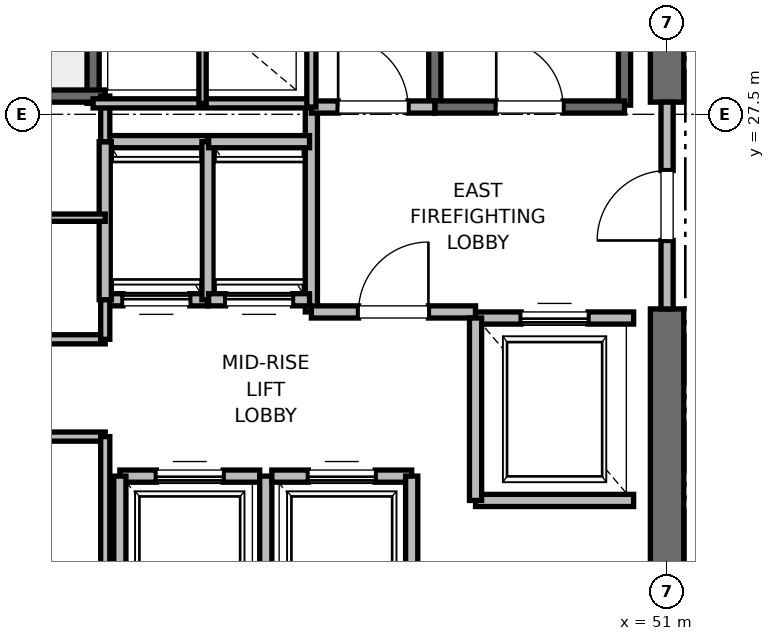
"""IFC4 building model, lengths in metres.
Left out: names, types, materials, properties, quantities, classifications, styles, units other than length and angle.
Written with IfcOpenShell. Run it as: python <this file> out.ifc"""

import sys

from ifc_helpers import new_model, si_unit, direction, frame, frame_2d, origin, place, context, subcontext, project, spatial, rectangle, extrude, element, fill, save


model = new_model("IFC4")
c1 = context("Model", 3, precision=1e-05, world=origin(), true_north=direction((0.0, 1.0)))
c2 = subcontext(c1, "Body", "Model", "MODEL_VIEW")
j1 = project(units=[si_unit("LENGTHUNIT", "METRE"), si_unit("PLANEANGLEUNIT", "RADIAN")], contexts=[c1])
p1 = place(None, origin())
s1 = spatial("IfcSite", under=j1, at=p1, CompositionType="ELEMENT")
p2 = place(p1, origin())
s2 = spatial("IfcBuilding", under=s1, at=p2, CompositionType="ELEMENT")
p3 = place(p2, frame((0.0, 0.0, 168.4)))
s3 = spatial("IfcBuildingStorey", under=s2, at=p3, CompositionType="ELEMENT", Elevation=168.4)
p4 = place(p3, frame((51.0, 18.5, 0.0), z_axis=(0.0, 0.0, 1.0), x_axis=(0.0, 1.0, 0.0)))
e1 = element("IfcWall", 1, at=p4, inside=s3, PredefinedType="SHEAR", context=c2, shape_type="SweptSolid", body=[
    extrude(rectangle(XDim=5.8, YDim=0.55, at=frame_2d((2.9, 0.0))), origin(), (0.0, 0.0, 1.0), 3.775),
])
p5 = place(p3, frame((51.0, 27.7, 0.0), z_axis=(0.0, 0.0, 1.0), x_axis=(0.0, 1.0, 0.0)))
e2 = element("IfcWall", 2, at=p5, inside=s3, PredefinedType="SHEAR", context=c2, shape_type="SweptSolid", body=[
    extrude(rectangle(XDim=8.8, YDim=0.55, at=frame_2d((4.4, 0.0))), origin(), (0.0, 0.0, 1.0), 3.775),
])
p6 = place(p3, frame((50.3, 27.65, 0.0), z_axis=(0.0, 0.0, 1.0), x_axis=(0.0, 1.0, 0.0)))
e3 = element("IfcWall", 3, at=p6, inside=s3, PredefinedType="SOLIDWALL", context=c2, shape_type="SweptSolid", body=[
    extrude(rectangle(XDim=8.15, YDim=0.2, at=frame_2d((4.075, 0.0))), origin(), (0.0, 0.0, 1.0), 3.775),
])
p7 = place(p3, frame((47.18, 27.62, 0.0), z_axis=(0.0, 0.0, 1.0), x_axis=(0.0, 1.0, 0.0)))
e4 = element("IfcWall", 4, at=p7, inside=s3, PredefinedType="SOLIDWALL", context=c2, shape_type="SweptSolid", body=[
    extrude(rectangle(XDim=8.18, YDim=0.2, at=frame_2d((4.09, 0.0))), origin(), (0.0, 0.0, 1.0), 3.775),
])
p8 = place(p3, frame((47.18, 27.62, 0.0), z_axis=(0.0, 0.0, 1.0), x_axis=(1.0, 0.0, 0.0)))
e5 = element("IfcWall", 5, at=p8, inside=s3, PredefinedType="SOLIDWALL", context=c2, shape_type="SweptSolid", body=[
    extrude(rectangle(XDim=3.12, YDim=0.2, at=frame_2d((1.56, 0.0))), origin(), (0.0, 0.0, 1.0), 3.775),
])
p9 = place(p8, frame((1.01, 0.0, 0.0)))
e6 = element("IfcOpeningElement", 6, at=p9, cuts=e5, PredefinedType="OPENING", context=c2, shape_type="SweptSolid", body=[
    extrude(rectangle(XDim=1.1, YDim=2.15, at=frame_2d((0.55, 1.075))), frame((0.0, 0.1, 0.0), z_axis=(0.0, -1.0, 0.0), x_axis=(1.0, 0.0, 0.0)), (0.0, 0.0, 1.0), 0.2),
])
p10 = place(p3, frame((41.56, 27.68, 0.0), z_axis=(0.0, 0.0, 1.0), x_axis=(0.0, 1.0, 0.0)))
e7 = element("IfcWall", 7, at=p10, inside=s3, PredefinedType="SOLIDWALL", context=c2, shape_type="SweptSolid", body=[
    extrude(rectangle(XDim=8.57, YDim=0.2, at=frame_2d((4.285, 0.0))), origin(), (0.0, 0.0, 1.0), 3.775),
])
p11 = place(p3, frame((38.44, 27.8, 0.0), z_axis=(0.0, 0.0, 1.0), x_axis=(1.0, 0.0, 0.0)))
e8 = element("IfcWall", 8, at=p11, inside=s3, PredefinedType="SOLIDWALL", context=c2, shape_type="SweptSolid", body=[
    extrude(rectangle(XDim=3.32, YDim=0.2, at=frame_2d((1.66, 0.0))), origin(), (0.0, 0.0, 1.0), 3.775),
])
p12 = place(p3, frame((45.15, 24.25, 0.0), z_axis=(0.0, 0.0, 1.0), x_axis=(0.0, 1.0, 0.0)))
e9 = element("IfcWall", 9, at=p12, inside=s3, PredefinedType="PARTITIONING", context=c2, shape_type="SweptSolid", body=[
    extrude(rectangle(XDim=3.37, YDim=0.2, at=frame_2d((1.685, 0.0))), origin(), (0.0, 0.0, 1.0), 3.775),
])
p13 = place(p3, frame((45.15, 24.25, 0.0), z_axis=(0.0, 0.0, 1.0), x_axis=(1.0, 0.0, 0.0)))
e10 = element("IfcWall", 10, at=p13, inside=s3, PredefinedType="PARTITIONING", context=c2, shape_type="SweptSolid", body=[
    extrude(rectangle(XDim=2.7, YDim=0.2, at=frame_2d((1.35, 0.0))), origin(), (0.0, 0.0, 1.0), 3.775),
])
p14 = place(p13, frame((0.775, 0.0, 0.0)))
e11 = element("IfcOpeningElement", 11, at=p14, cuts=e10, PredefinedType="OPENING", context=c2, shape_type="SweptSolid", body=[
    extrude(rectangle(XDim=1.15, YDim=2.2, at=frame_2d((0.575, 1.1))), frame((0.0, 0.1, 0.0), z_axis=(0.0, -1.0, 0.0), x_axis=(1.0, 0.0, 0.0)), (0.0, 0.0, 1.0), 0.2),
])
p15 = place(p3, frame((45.15, 27.62, 0.0), z_axis=(0.0, 0.0, 1.0), x_axis=(1.0, 0.0, 0.0)))
e12 = element("IfcWall", 12, at=p15, inside=s3, PredefinedType="PARTITIONING", context=c2, shape_type="SweptSolid", body=[
    extrude(rectangle(XDim=2.03, YDim=0.2, at=frame_2d((1.015, 0.0))), origin(), (0.0, 0.0, 1.0), 3.775),
])
p16 = place(p15, frame((0.44, 0.0, 0.0)))
e13 = element("IfcOpeningElement", 13, at=p16, cuts=e12, PredefinedType="OPENING", context=c2, shape_type="SweptSolid", body=[
    extrude(rectangle(XDim=1.15, YDim=2.2, at=frame_2d((0.575, 1.1))), frame((0.0, 0.1, 0.0), z_axis=(0.0, -1.0, 0.0), x_axis=(1.0, 0.0, 0.0)), (0.0, 0.0, 1.0), 0.2),
])
p17 = place(p3, frame((51.0, 24.3, 0.0), z_axis=(0.0, 0.0, 1.0), x_axis=(0.0, 1.0, 0.0)))
e14 = element("IfcWall", 14, at=p17, inside=s3, PredefinedType="PARTITIONING", context=c2, shape_type="SweptSolid", body=[
    extrude(rectangle(XDim=3.4, YDim=0.2, at=frame_2d((1.7, 0.0))), origin(), (0.0, 0.0, 1.0), 2.755),
])
p18 = place(p17, frame((1.125, 0.0, 0.0)))
e15 = element("IfcOpeningElement", 15, at=p18, cuts=e14, PredefinedType="OPENING", context=c2, shape_type="SweptSolid", body=[
    extrude(rectangle(XDim=1.15, YDim=2.2, at=frame_2d((0.575, 1.1))), frame((0.0, 0.1, 0.0), z_axis=(0.0, -1.0, 0.0), x_axis=(1.0, 0.0, 0.0)), (0.0, 0.0, 1.0), 0.2),
])
p19 = place(p3, frame((47.85, 21.15, 0.0), z_axis=(0.0, 0.0, 1.0), x_axis=(1.0, 0.0, 0.0)))
e16 = element("IfcWall", 16, at=p19, inside=s3, PredefinedType="SOLIDWALL", context=c2, shape_type="SweptSolid", body=[
    extrude(rectangle(XDim=2.6, YDim=0.2, at=frame_2d((1.3, 0.0))), origin(), (0.0, 0.0, 1.0), 3.775),
])
p20 = place(p3, frame((50.45, 24.15, 0.0), z_axis=(0.0, 0.0, 1.0), x_axis=(-1.0, 0.0, 0.0)))
e17 = element("IfcWall", 17, at=p20, inside=s3, PredefinedType="SOLIDWALL", context=c2, shape_type="SweptSolid", body=[
    extrude(rectangle(XDim=2.6, YDim=0.2, at=frame_2d((1.3, 0.0))), origin(), (0.0, 0.0, 1.0), 2.755),
])
p21 = place(p20, frame((0.75, 0.0, 0.0)))
e18 = element("IfcOpeningElement", 18, at=p21, cuts=e17, PredefinedType="OPENING", context=c2, shape_type="SweptSolid", body=[
    extrude(rectangle(XDim=1.1, YDim=2.2, at=frame_2d((0.55, 1.1))), frame((0.0, 0.1, 0.0), z_axis=(0.0, -1.0, 0.0), x_axis=(1.0, 0.0, 0.0)), (0.0, 0.0, 1.0), 0.2),
])
p22 = place(p3, frame((47.85, 24.15, 0.0), z_axis=(0.0, 0.0, 1.0), x_axis=(0.0, -1.0, 0.0)))
e19 = element("IfcWall", 19, at=p22, inside=s3, PredefinedType="SOLIDWALL", context=c2, shape_type="SweptSolid", body=[
    extrude(rectangle(XDim=3.0, YDim=0.2, at=frame_2d((1.5, 0.0))), origin(), (0.0, 0.0, 1.0), 3.775),
])
p23 = place(p3, frame((44.3, 21.55, 0.0), z_axis=(0.0, 0.0, 1.0), x_axis=(-1.0, 0.0, 0.0)))
e20 = element("IfcWall", 20, at=p23, inside=s3, PredefinedType="SOLIDWALL", context=c2, shape_type="SweptSolid", body=[
    extrude(rectangle(XDim=2.3, YDim=0.2, at=frame_2d((1.15, 0.0))), origin(), (0.0, 0.0, 1.0), 3.775),
])
p24 = place(p23, frame((0.6, 0.0, 0.0)))
e21 = element("IfcOpeningElement", 21, at=p24, cuts=e20, PredefinedType="OPENING", context=c2, shape_type="SweptSolid", body=[
    extrude(rectangle(XDim=1.1, YDim=2.2, at=frame_2d((0.55, 1.1))), frame((0.0, 0.1, 0.0), z_axis=(0.0, -1.0, 0.0), x_axis=(1.0, 0.0, 0.0)), (0.0, 0.0, 1.0), 0.2),
])
p25 = place(p3, frame((42.0, 21.55, 0.0), z_axis=(0.0, 0.0, 1.0), x_axis=(0.0, -1.0, 0.0)))
e22 = element("IfcWall", 22, at=p25, inside=s3, PredefinedType="SOLIDWALL", context=c2, shape_type="SweptSolid", body=[
    extrude(rectangle(XDim=2.6, YDim=0.2, at=frame_2d((1.3, 0.0))), origin(), (0.0, 0.0, 1.0), 2.755),
])
p26 = place(p3, frame((44.4, 18.95, 0.0), z_axis=(0.0, 0.0, 1.0), x_axis=(0.0, 1.0, 0.0)))
e23 = element("IfcWall", 23, at=p26, inside=s3, PredefinedType="SOLIDWALL", context=c2, shape_type="SweptSolid", body=[
    extrude(rectangle(XDim=2.6, YDim=0.2, at=frame_2d((1.3, 0.0))), origin(), (0.0, 0.0, 1.0), 3.775),
])
p27 = place(p3, frame((46.8, 21.55, 0.0), z_axis=(0.0, 0.0, 1.0), x_axis=(-1.0, 0.0, 0.0)))
e24 = element("IfcWall", 24, at=p27, inside=s3, PredefinedType="SOLIDWALL", context=c2, shape_type="SweptSolid", body=[
    extrude(rectangle(XDim=2.3, YDim=0.2, at=frame_2d((1.15, 0.0))), origin(), (0.0, 0.0, 1.0), 3.775),
])
p28 = place(p27, frame((0.6, 0.0, 0.0)))
e25 = element("IfcOpeningElement", 25, at=p28, cuts=e24, PredefinedType="OPENING", context=c2, shape_type="SweptSolid", body=[
    extrude(rectangle(XDim=1.1, YDim=2.2, at=frame_2d((0.55, 1.1))), frame((0.0, 0.1, 0.0), z_axis=(0.0, -1.0, 0.0), x_axis=(1.0, 0.0, 0.0)), (0.0, 0.0, 1.0), 0.2),
])
p29 = place(p3, frame((46.8, 18.95, 0.0), z_axis=(0.0, 0.0, 1.0), x_axis=(0.0, 1.0, 0.0)))
e26 = element("IfcWall", 26, at=p29, inside=s3, PredefinedType="SOLIDWALL", context=c2, shape_type="SweptSolid", body=[
    extrude(rectangle(XDim=2.6, YDim=0.2, at=frame_2d((1.3, 0.0))), origin(), (0.0, 0.0, 1.0), 3.775),
])
p30 = place(p3, frame((41.76, 24.45, 0.0), z_axis=(0.0, 0.0, 1.0), x_axis=(1.0, 0.0, 0.0)))
e27 = element("IfcWall", 27, at=p30, inside=s3, PredefinedType="SOLIDWALL", context=c2, shape_type="SweptSolid", body=[
    extrude(rectangle(XDim=1.68, YDim=0.2, at=frame_2d((0.84, 0.0))), origin(), (0.0, 0.0, 1.0), 3.775),
])
p31 = place(p30, frame((0.29, 0.0, 0.0)))
e28 = element("IfcOpeningElement", 28, at=p31, cuts=e27, PredefinedType="OPENING", context=c2, shape_type="SweptSolid", body=[
    extrude(rectangle(XDim=1.1, YDim=2.2, at=frame_2d((0.55, 1.1))), frame((0.0, 0.1, 0.0), z_axis=(0.0, -1.0, 0.0), x_axis=(1.0, 0.0, 0.0)), (0.0, 0.0, 1.0), 0.2),
])
p32 = place(p3, frame((43.44, 27.05, 0.0), z_axis=(0.0, 0.0, 1.0), x_axis=(-1.0, 0.0, 0.0)))
e29 = element("IfcWall", 29, at=p32, inside=s3, PredefinedType="SOLIDWALL", context=c2, shape_type="SweptSolid", body=[
    extrude(rectangle(XDim=1.68, YDim=0.2, at=frame_2d((0.84, 0.0))), origin(), (0.0, 0.0, 1.0), 3.775),
])
for number, where, z_axis, x_axis in (
    (30, (41.76, 27.05, 0.0), (0.0, 0.0, 1.0), (0.0, -1.0, 0.0)),
    (31, (43.45, 24.45, 0.0), (0.0, 0.0, 1.0), (0.0, 1.0, 0.0)),
):
    element("IfcWall", number, at=place(p3, frame(where, z_axis=z_axis, x_axis=x_axis)), inside=s3, PredefinedType="SOLIDWALL", context=c2, shape_type="SweptSolid", body=[
        extrude(rectangle(XDim=2.6, YDim=0.2, at=frame_2d((1.3, 0.0))), origin(), (0.0, 0.0, 1.0), 3.775),
    ])
p33 = place(p3, frame((43.46, 24.45, 0.0), z_axis=(0.0, 0.0, 1.0), x_axis=(1.0, 0.0, 0.0)))
e32 = element("IfcWall", 32, at=p33, inside=s3, PredefinedType="SOLIDWALL", context=c2, shape_type="SweptSolid", body=[
    extrude(rectangle(XDim=1.66, YDim=0.2, at=frame_2d((0.83, 0.0))), origin(), (0.0, 0.0, 1.0), 3.775),
])
p34 = place(p33, frame((0.28, 0.0, 0.0)))
e33 = element("IfcOpeningElement", 33, at=p34, cuts=e32, PredefinedType="OPENING", context=c2, shape_type="SweptSolid", body=[
    extrude(rectangle(XDim=1.1, YDim=2.2, at=frame_2d((0.55, 1.1))), frame((0.0, 0.1, 0.0), z_axis=(0.0, -1.0, 0.0), x_axis=(1.0, 0.0, 0.0)), (0.0, 0.0, 1.0), 0.2),
])
p35 = place(p3, frame((45.12, 27.05, 0.0), z_axis=(0.0, 0.0, 1.0), x_axis=(-1.0, 0.0, 0.0)))
e34 = element("IfcWall", 34, at=p35, inside=s3, PredefinedType="SOLIDWALL", context=c2, shape_type="SweptSolid", body=[
    extrude(rectangle(XDim=1.66, YDim=0.2, at=frame_2d((0.83, 0.0))), origin(), (0.0, 0.0, 1.0), 3.775),
])
for number, where, z_axis, x_axis in (
    (35, (39.95, 22.2, 0.0), (0.0, 0.0, 1.0), (1.0, 0.0, 0.0)),
    (36, (39.95, 23.8, 0.0), (0.0, 0.0, 1.0), (1.0, 0.0, 0.0)),
):
    element("IfcWall", number, at=place(p3, frame(where, z_axis=z_axis, x_axis=x_axis)), inside=s3, PredefinedType="PARTITIONING", context=c2, shape_type="SweptSolid", body=[
        extrude(rectangle(XDim=1.81, YDim=0.15, at=frame_2d((0.905, 0.0))), origin(), (0.0, 0.0, 1.0), 2.85),
    ])
p36 = place(p3, frame((39.95, 25.8, 0.0), z_axis=(0.0, 0.0, 1.0), x_axis=(1.0, 0.0, 0.0)))
e37 = element("IfcWall", 37, at=p36, inside=s3, PredefinedType="PARTITIONING", context=c2, shape_type="SweptSolid", body=[
    extrude(rectangle(XDim=1.81, YDim=0.12, at=frame_2d((0.905, 0.0))), origin(), (0.0, 0.0, 1.0), 2.85),
])
p37 = place(p3, frame((41.76, 18.6, 0.0), z_axis=(0.0, 0.0, 1.0), x_axis=(0.0, 1.0, 0.0)))
e38 = element("IfcWall", 38, at=p37, inside=s3, PredefinedType="PARTITIONING", context=c2, shape_type="SweptSolid", body=[
    extrude(rectangle(XDim=3.6, YDim=0.15, at=frame_2d((1.8, 0.0))), origin(), (0.0, 0.0, 1.0), 2.755),
])
p38 = place(p3, frame((41.76, 23.8, 0.0), z_axis=(0.0, 0.0, 1.0), x_axis=(0.0, 1.0, 0.0)))
e39 = element("IfcWall", 39, at=p38, inside=s3, PredefinedType="PARTITIONING", context=c2, shape_type="SweptSolid", body=[
    extrude(rectangle(XDim=0.65, YDim=0.15, at=frame_2d((0.325, 0.0))), origin(), (0.0, 0.0, 1.0), 2.85),
])
p39 = place(p3, frame((41.76, 27.05, 0.0), z_axis=(0.0, 0.0, 1.0), x_axis=(0.0, 1.0, 0.0)))
e40 = element("IfcWall", 40, at=p39, inside=s3, PredefinedType="PARTITIONING", context=c2, shape_type="SweptSolid", body=[
    extrude(rectangle(XDim=0.75, YDim=0.15, at=frame_2d((0.375, 0.0))), origin(), (0.0, 0.0, 1.0), 2.85),
])
p40 = place(p3, frame((41.56, 27.68, 0.0), z_axis=(0.0, 0.0, 1.0), x_axis=(1.0, 0.0, 0.0)))
e41 = element("IfcWall", 41, at=p40, inside=s3, PredefinedType="PARTITIONING", context=c2, shape_type="SweptSolid", body=[
    extrude(rectangle(XDim=3.59, YDim=0.15, at=frame_2d((1.795, 0.0))), origin(), (0.0, 0.0, 1.0), 2.85),
])
p41 = place(p3, frame((45.15, 27.62, 0.0), z_axis=(0.0, 0.0, 1.0), x_axis=(0.0, 1.0, 0.0)))
e42 = element("IfcWall", 42, at=p41, inside=s3, PredefinedType="PARTITIONING", context=c2, shape_type="SweptSolid", body=[
    extrude(rectangle(XDim=3.1, YDim=0.15, at=frame_2d((1.55, 0.0))), origin(), (0.0, 0.0, 1.0), 2.85),
])
p42 = place(p3, frame((43.36, 27.68, 0.0), z_axis=(0.0, 0.0, 1.0), x_axis=(0.0, 1.0, 0.0)))
e43 = element("IfcWall", 43, at=p42, inside=s3, PredefinedType="PARTITIONING", context=c2, shape_type="SweptSolid", body=[
    extrude(rectangle(XDim=3.04, YDim=0.12, at=frame_2d((1.52, 0.0))), origin(), (0.0, 0.0, 1.0), 2.85),
])
p43 = place(p9, origin())
e44 = element("IfcDoor", 44, at=p43, inside=s3, OperationType="SINGLE_SWING_LEFT", PredefinedType="DOOR", context=c2, shape_type="SweptSolid", body=[
    extrude(rectangle(XDim=1.1, YDim=2.15, at=frame_2d((0.55, 1.075))), frame((0.0, 0.025, 0.0), z_axis=(0.0, -1.0, 0.0), x_axis=(1.0, 0.0, 0.0)), (0.0, 0.0, 1.0), 0.05),
])
fill(e6, e44)
p44 = place(p14, origin())
e45 = element("IfcDoor", 45, at=p44, inside=s3, OperationType="SINGLE_SWING_RIGHT", PredefinedType="DOOR", context=c2, shape_type="SweptSolid", body=[
    extrude(rectangle(XDim=1.15, YDim=2.2, at=frame_2d((0.575, 1.1))), frame((0.0, 0.025, 0.0), z_axis=(0.0, -1.0, 0.0), x_axis=(1.0, 0.0, 0.0)), (0.0, 0.0, 1.0), 0.05),
])
fill(e11, e45)
p45 = place(p16, origin())
e46 = element("IfcDoor", 46, at=p45, inside=s3, OperationType="SINGLE_SWING_LEFT", PredefinedType="DOOR", context=c2, shape_type="SweptSolid", body=[
    extrude(rectangle(XDim=1.15, YDim=2.2, at=frame_2d((0.575, 1.1))), frame((0.0, 0.025, 0.0), z_axis=(0.0, -1.0, 0.0), x_axis=(1.0, 0.0, 0.0)), (0.0, 0.0, 1.0), 0.05),
])
fill(e13, e46)
p46 = place(p18, origin())
e47 = element("IfcDoor", 47, at=p46, inside=s3, OperationType="SINGLE_SWING_LEFT", PredefinedType="DOOR", context=c2, shape_type="SweptSolid", body=[
    extrude(rectangle(XDim=1.15, YDim=2.2, at=frame_2d((0.575, 1.1))), frame((0.0, 0.025, 0.0), z_axis=(0.0, -1.0, 0.0), x_axis=(1.0, 0.0, 0.0)), (0.0, 0.0, 1.0), 0.05),
])
fill(e15, e47)
p47 = place(p21, origin())
e48 = element("IfcDoor", 48, at=p47, inside=s3, OperationType="SLIDING_TO_RIGHT", PredefinedType="DOOR", context=c2, shape_type="SweptSolid", body=[
    extrude(rectangle(XDim=1.1, YDim=2.2, at=frame_2d((0.55, 1.1))), frame((0.0, 0.025, 0.0), z_axis=(0.0, -1.0, 0.0), x_axis=(1.0, 0.0, 0.0)), (0.0, 0.0, 1.0), 0.05),
])
fill(e18, e48)
p48 = place(p24, origin())
e49 = element("IfcDoor", 49, at=p48, inside=s3, OperationType="SLIDING_TO_RIGHT", PredefinedType="DOOR", context=c2, shape_type="SweptSolid", body=[
    extrude(rectangle(XDim=1.1, YDim=2.2, at=frame_2d((0.55, 1.1))), frame((0.0, 0.025, 0.0), z_axis=(0.0, -1.0, 0.0), x_axis=(1.0, 0.0, 0.0)), (0.0, 0.0, 1.0), 0.05),
])
fill(e21, e49)
p49 = place(p28, origin())
e50 = element("IfcDoor", 50, at=p49, inside=s3, OperationType="SLIDING_TO_RIGHT", PredefinedType="DOOR", context=c2, shape_type="SweptSolid", body=[
    extrude(rectangle(XDim=1.1, YDim=2.2, at=frame_2d((0.55, 1.1))), frame((0.0, 0.025, 0.0), z_axis=(0.0, -1.0, 0.0), x_axis=(1.0, 0.0, 0.0)), (0.0, 0.0, 1.0), 0.05),
])
fill(e25, e50)
p50 = place(p31, origin())
e51 = element("IfcDoor", 51, at=p50, inside=s3, OperationType="SLIDING_TO_RIGHT", PredefinedType="DOOR", context=c2, shape_type="SweptSolid", body=[
    extrude(rectangle(XDim=1.1, YDim=2.2, at=frame_2d((0.55, 1.1))), frame((0.0, 0.025, 0.0), z_axis=(0.0, -1.0, 0.0), x_axis=(1.0, 0.0, 0.0)), (0.0, 0.0, 1.0), 0.05),
])
fill(e28, e51)
p51 = place(p34, origin())
e52 = element("IfcDoor", 52, at=p51, inside=s3, OperationType="SLIDING_TO_RIGHT", PredefinedType="DOOR", context=c2, shape_type="SweptSolid", body=[
    extrude(rectangle(XDim=1.1, YDim=2.2, at=frame_2d((0.55, 1.1))), frame((0.0, 0.025, 0.0), z_axis=(0.0, -1.0, 0.0), x_axis=(1.0, 0.0, 0.0)), (0.0, 0.0, 1.0), 0.05),
])
fill(e33, e52)
save(model, sys.argv[1])
